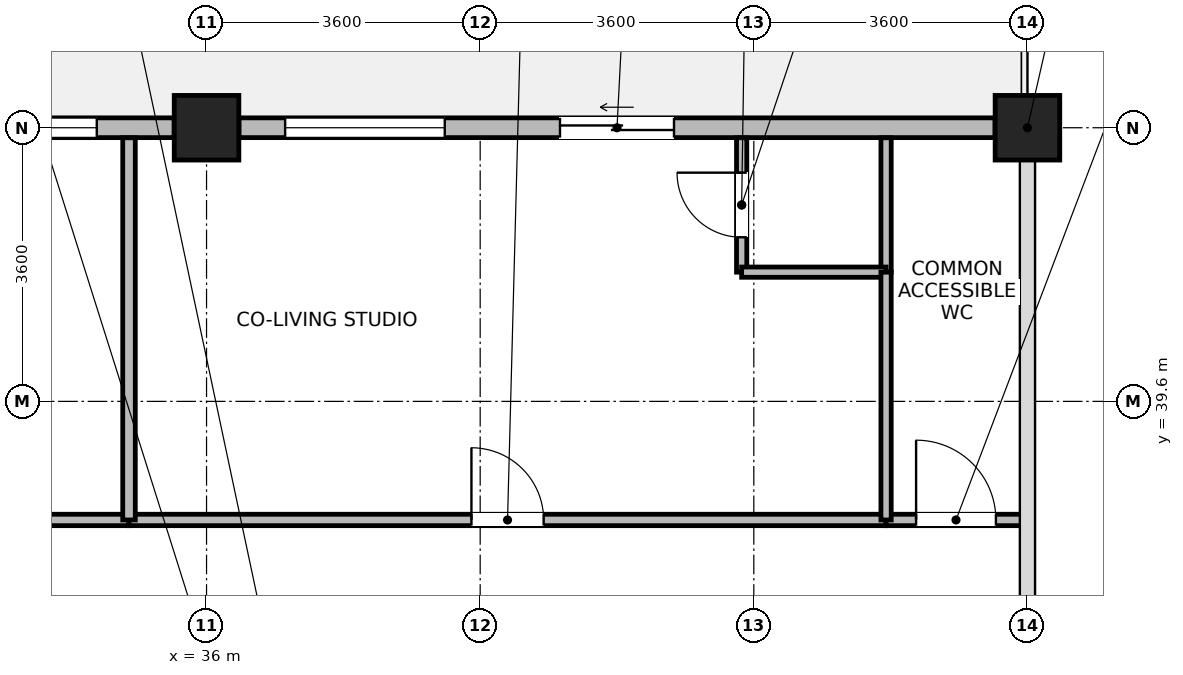
"""IFC4 building model, lengths in metres.
Left out: names, types, materials, properties, quantities, classifications, styles, units other than length and angle.
Written with IfcOpenShell. Run it as: python <this file> out.ifc"""

import sys

from ifc_helpers import new_model, si_unit, direction, frame, frame_2d, origin, origin_2d, place, context, subcontext, project, spatial, rectangle, extrude, source, transform, mapped, element, fill, save


model = new_model("IFC4")
c1 = context("Model", 3, precision=1e-05, world=origin(), true_north=direction((0.0, 1.0)))
c2 = subcontext(c1, "Body", "Model", "MODEL_VIEW")
j1 = project(units=[si_unit("LENGTHUNIT", "METRE"), si_unit("PLANEANGLEUNIT", "RADIAN")], contexts=[c1])
p1 = place(None, origin())
s1 = spatial("IfcSite", under=j1, at=p1, CompositionType="ELEMENT")
p2 = place(p1, origin())
s2 = spatial("IfcBuilding", under=s1, at=p2, CompositionType="ELEMENT")
p3 = place(p2, frame((0.0, 0.0, 261.0)))
s3 = spatial("IfcBuildingStorey", under=s2, at=p3, CompositionType="ELEMENT", Elevation=261.0)
m1 = source(origin(), c2, "Body", "SweptSolid", [
    extrude(rectangle(XDim=0.85, YDim=0.85, at=origin_2d()), origin(), (0.0, 0.0, 1.0), 3.7),
])
for number, where, z_axis, x_axis in (
    (1, (36.0, 43.2, 0.0), (0.0, 0.0, 1.0), (1.0, 0.0, 0.0)),
    (2, (46.8, 43.2, 0.0), (0.0, 0.0, 1.0), (1.0, 0.0, 0.0)),
):
    element("IfcColumn", number, at=place(p3, frame(where, z_axis=z_axis, x_axis=x_axis)), inside=s3, PredefinedType="COLUMN", context=c2, shape_type="MappedRepresentation", body=[
        mapped(m1, transform((0.0, 0.0, 0.0), x_axis=(1.0, 0.0, 0.0), y_axis=(0.0, 1.0, 0.0), z_axis=(0.0, 0.0, 1.0), scale=1.0)),
    ])
p4 = place(p3, frame((36.426, 43.2, 0.0), z_axis=(0.0, 0.0, 1.0), x_axis=(1.0, 0.0, 0.0)))
e3 = element("IfcWall", 3, at=p4, inside=s3, PredefinedType="STANDARD", context=c2, shape_type="SweptSolid", body=[
    extrude(rectangle(XDim=9.948, YDim=0.26, at=frame_2d((4.974, 0.0))), origin(), (0.0, 0.0, 1.0), 3.055),
])
p5 = place(p4, frame((4.224, 0.0, 0.0)))
e4 = element("IfcOpeningElement", 4, at=p5, cuts=e3, PredefinedType="OPENING", context=c2, shape_type="SweptSolid", body=[
    extrude(rectangle(XDim=1.5, YDim=2.15, at=frame_2d((0.75, 1.075))), frame((0.0, 0.14, 0.0), z_axis=(0.0, -1.0, 0.0), x_axis=(1.0, 0.0, 0.0)), (0.0, 0.0, 1.0), 0.28),
])
p6 = place(p4, frame((0.608, 0.0, 0.85)))
e5 = element("IfcOpeningElement", 5, at=p6, cuts=e3, PredefinedType="OPENING", context=c2, shape_type="SweptSolid", body=[
    extrude(rectangle(XDim=2.1, YDim=1.95, at=frame_2d((1.05, 0.975))), frame((0.0, 0.14, 0.0), z_axis=(0.0, -1.0, 0.0), x_axis=(1.0, 0.0, 0.0)), (0.0, 0.0, 1.0), 0.28),
])
p7 = place(p3, frame((32.588, 43.2, 0.0), z_axis=(0.0, 0.0, 1.0), x_axis=(1.0, 0.0, 0.0)))
e6 = element("IfcWall", 6, at=p7, inside=s3, PredefinedType="STANDARD", context=c2, shape_type="SweptSolid", body=[
    extrude(rectangle(XDim=2.986, YDim=0.26, at=frame_2d((1.493, 0.0))), origin(), (0.0, 0.0, 1.0), 3.055),
])
p8 = place(p7, frame((1.018, 0.0, 0.85)))
e7 = element("IfcOpeningElement", 7, at=p8, cuts=e6, PredefinedType="OPENING", context=c2, shape_type="SweptSolid", body=[
    extrude(rectangle(XDim=0.95, YDim=1.75, at=frame_2d((0.475, 0.875))), frame((0.0, 0.14, 0.0), z_axis=(0.0, -1.0, 0.0), x_axis=(1.0, 0.0, 0.0)), (0.0, 0.0, 1.0), 0.28),
])
p9 = place(p3, frame((43.04, 41.3, 0.0), z_axis=(0.0, 0.0, 1.0), x_axis=(0.0, 1.0, 0.0)))
e8 = element("IfcWall", 8, at=p9, inside=s3, PredefinedType="PARTITIONING", context=c2, shape_type="SweptSolid", body=[
    extrude(rectangle(XDim=1.768, YDim=0.135, at=frame_2d((0.884, 0.0))), origin(), (0.0, 0.0, 1.0), 3.455),
])
p10 = place(p9, frame((0.459, 0.0, 0.0)))
e9 = element("IfcOpeningElement", 9, at=p10, cuts=e8, PredefinedType="OPENING", context=c2, shape_type="SweptSolid", body=[
    extrude(rectangle(XDim=0.85, YDim=2.04, at=frame_2d((0.425, 1.02))), frame((0.0, 0.078, 0.0), z_axis=(0.0, -1.0, 0.0), x_axis=(1.0, 0.0, 0.0)), (0.0, 0.0, 1.0), 0.155),
])
p11 = place(p3, frame((44.94, 41.3, 0.0), z_axis=(0.0, 0.0, 1.0), x_axis=(0.0, 1.0, 0.0)))
e10 = element("IfcWall", 10, at=p11, inside=s3, PredefinedType="PARTITIONING", context=c2, shape_type="SweptSolid", body=[
    extrude(rectangle(XDim=1.768, YDim=0.135, at=frame_2d((0.884, 0.0))), origin(), (0.0, 0.0, 1.0), 3.455),
])
p12 = place(p3, frame((43.04, 41.3, 0.0), z_axis=(0.0, 0.0, 1.0), x_axis=(1.0, 0.0, 0.0)))
e11 = element("IfcWall", 11, at=p12, inside=s3, PredefinedType="PARTITIONING", context=c2, shape_type="SweptSolid", body=[
    extrude(rectangle(XDim=1.9, YDim=0.135, at=frame_2d((0.95, 0.0))), origin(), (0.0, 0.0, 1.0), 3.455),
])
p13 = place(p3, frame((23.12, 38.04, 0.0), z_axis=(0.0, 0.0, 1.0), x_axis=(1.0, 0.0, 0.0)))
e12 = element("IfcWall", 12, at=p13, inside=s3, PredefinedType="PARTITIONING", context=c2, shape_type="SweptSolid", body=[
    extrude(rectangle(XDim=11.86, YDim=0.15, at=frame_2d((5.93, 0.0))), origin(), (0.0, 0.0, 1.0), 3.455),
])
p14 = place(p13, frame((5.48, 0.0, 0.0)))
e13 = element("IfcOpeningElement", 13, at=p14, cuts=e12, PredefinedType="OPENING", context=c2, shape_type="SweptSolid", body=[
    extrude(rectangle(XDim=0.9, YDim=2.08, at=frame_2d((0.45, 1.04))), frame((0.0, 0.085, 0.0), z_axis=(0.0, -1.0, 0.0), x_axis=(1.0, 0.0, 0.0)), (0.0, 0.0, 1.0), 0.17),
])
p15 = place(p3, frame((34.98, 38.04, 0.0), z_axis=(0.0, 0.0, 1.0), x_axis=(1.0, 0.0, 0.0)))
e14 = element("IfcWall", 14, at=p15, inside=s3, PredefinedType="PARTITIONING", context=c2, shape_type="SweptSolid", body=[
    extrude(rectangle(XDim=9.96, YDim=0.15, at=frame_2d((4.98, 0.0))), origin(), (0.0, 0.0, 1.0), 3.455),
])
p16 = place(p15, frame((4.505, 0.0, 0.0)))
e15 = element("IfcOpeningElement", 15, at=p16, cuts=e14, PredefinedType="OPENING", context=c2, shape_type="SweptSolid", body=[
    extrude(rectangle(XDim=0.95, YDim=2.1, at=frame_2d((0.475, 1.05))), frame((0.0, 0.085, 0.0), z_axis=(0.0, -1.0, 0.0), x_axis=(1.0, 0.0, 0.0)), (0.0, 0.0, 1.0), 0.17),
])
p17 = place(p3, frame((44.94, 38.04, 0.0), z_axis=(0.0, 0.0, 1.0), x_axis=(1.0, 0.0, 0.0)))
e16 = element("IfcWall", 16, at=p17, inside=s3, PredefinedType="PARTITIONING", context=c2, shape_type="SweptSolid", body=[
    extrude(rectangle(XDim=1.84, YDim=0.15, at=frame_2d((0.92, 0.0))), origin(), (0.0, 0.0, 1.0), 3.455),
])
p18 = place(p17, frame((0.395, 0.0, 0.0)))
e17 = element("IfcOpeningElement", 17, at=p18, cuts=e16, PredefinedType="OPENING", context=c2, shape_type="SweptSolid", body=[
    extrude(rectangle(XDim=1.05, YDim=2.12, at=frame_2d((0.525, 1.06))), frame((0.0, 0.085, 0.0), z_axis=(0.0, -1.0, 0.0), x_axis=(1.0, 0.0, 0.0)), (0.0, 0.0, 1.0), 0.17),
])
p19 = place(p3, frame((34.98, 38.04, 0.0), z_axis=(0.0, 0.0, 1.0), x_axis=(0.0, 1.0, 0.0)))
e18 = element("IfcWall", 18, at=p19, inside=s3, PredefinedType="PARTITIONING", context=c2, shape_type="SweptSolid", body=[
    extrude(rectangle(XDim=5.028, YDim=0.165, at=frame_2d((2.514, 0.0))), origin(), (0.0, 0.0, 1.0), 3.455),
])
p20 = place(p3, frame((44.94, 38.04, 0.0), z_axis=(0.0, 0.0, 1.0), x_axis=(0.0, 1.0, 0.0)))
e19 = element("IfcWall", 19, at=p20, inside=s3, PredefinedType="PARTITIONING", context=c2, shape_type="SweptSolid", body=[
    extrude(rectangle(XDim=3.26, YDim=0.135, at=frame_2d((1.63, 0.0))), origin(), (0.0, 0.0, 1.0), 3.455),
])
p21 = place(p5, origin())
e20 = element("IfcDoor", 20, at=p21, inside=s3, OperationType="SLIDING_TO_LEFT", PredefinedType="DOOR", context=c2, shape_type="SweptSolid", body=[
    extrude(rectangle(XDim=1.5, YDim=2.15, at=frame_2d((0.75, 1.075))), frame((0.0, 0.025, 0.0), z_axis=(0.0, -1.0, 0.0), x_axis=(1.0, 0.0, 0.0)), (0.0, 0.0, 1.0), 0.05),
])
fill(e4, e20)
p22 = place(p6, origin())
e21 = element("IfcWindow", 21, at=p22, inside=s3, PartitioningType="SINGLE_PANEL", PredefinedType="WINDOW", context=c2, shape_type="SweptSolid", body=[
    extrude(rectangle(XDim=2.1, YDim=1.95, at=frame_2d((1.05, 0.975))), frame((0.0, 0.03, 0.0), z_axis=(0.0, -1.0, 0.0), x_axis=(1.0, 0.0, 0.0)), (0.0, 0.0, 1.0), 0.06),
])
fill(e5, e21)
p23 = place(p8, origin())
e22 = element("IfcWindow", 22, at=p23, inside=s3, PartitioningType="SINGLE_PANEL", PredefinedType="WINDOW", context=c2, shape_type="SweptSolid", body=[
    extrude(rectangle(XDim=0.95, YDim=1.75, at=frame_2d((0.475, 0.875))), frame((0.0, 0.03, 0.0), z_axis=(0.0, -1.0, 0.0), x_axis=(1.0, 0.0, 0.0)), (0.0, 0.0, 1.0), 0.06),
])
fill(e7, e22)
p24 = place(p10, origin())
e23 = element("IfcDoor", 23, at=p24, inside=s3, OperationType="SINGLE_SWING_RIGHT", PredefinedType="DOOR", context=c2, shape_type="SweptSolid", body=[
    extrude(rectangle(XDim=0.85, YDim=2.04, at=frame_2d((0.425, 1.02))), frame((0.0, 0.025, 0.0), z_axis=(0.0, -1.0, 0.0), x_axis=(1.0, 0.0, 0.0)), (0.0, 0.0, 1.0), 0.05),
])
fill(e9, e23)
p25 = place(p16, origin())
e24 = element("IfcDoor", 24, at=p25, inside=s3, OperationType="SINGLE_SWING_LEFT", PredefinedType="DOOR", context=c2, shape_type="SweptSolid", body=[
    extrude(rectangle(XDim=0.95, YDim=2.1, at=frame_2d((0.475, 1.05))), frame((0.0, 0.025, 0.0), z_axis=(0.0, -1.0, 0.0), x_axis=(1.0, 0.0, 0.0)), (0.0, 0.0, 1.0), 0.05),
])
fill(e15, e24)
p26 = place(p18, origin())
e25 = element("IfcDoor", 25, at=p26, inside=s3, OperationType="SINGLE_SWING_LEFT", PredefinedType="DOOR", context=c2, shape_type="SweptSolid", body=[
    extrude(rectangle(XDim=1.05, YDim=2.12, at=frame_2d((0.525, 1.06))), frame((0.0, 0.025, 0.0), z_axis=(0.0, -1.0, 0.0), x_axis=(1.0, 0.0, 0.0)), (0.0, 0.0, 1.0), 0.05),
])
fill(e17, e25)
save(model, sys.argv[1])
